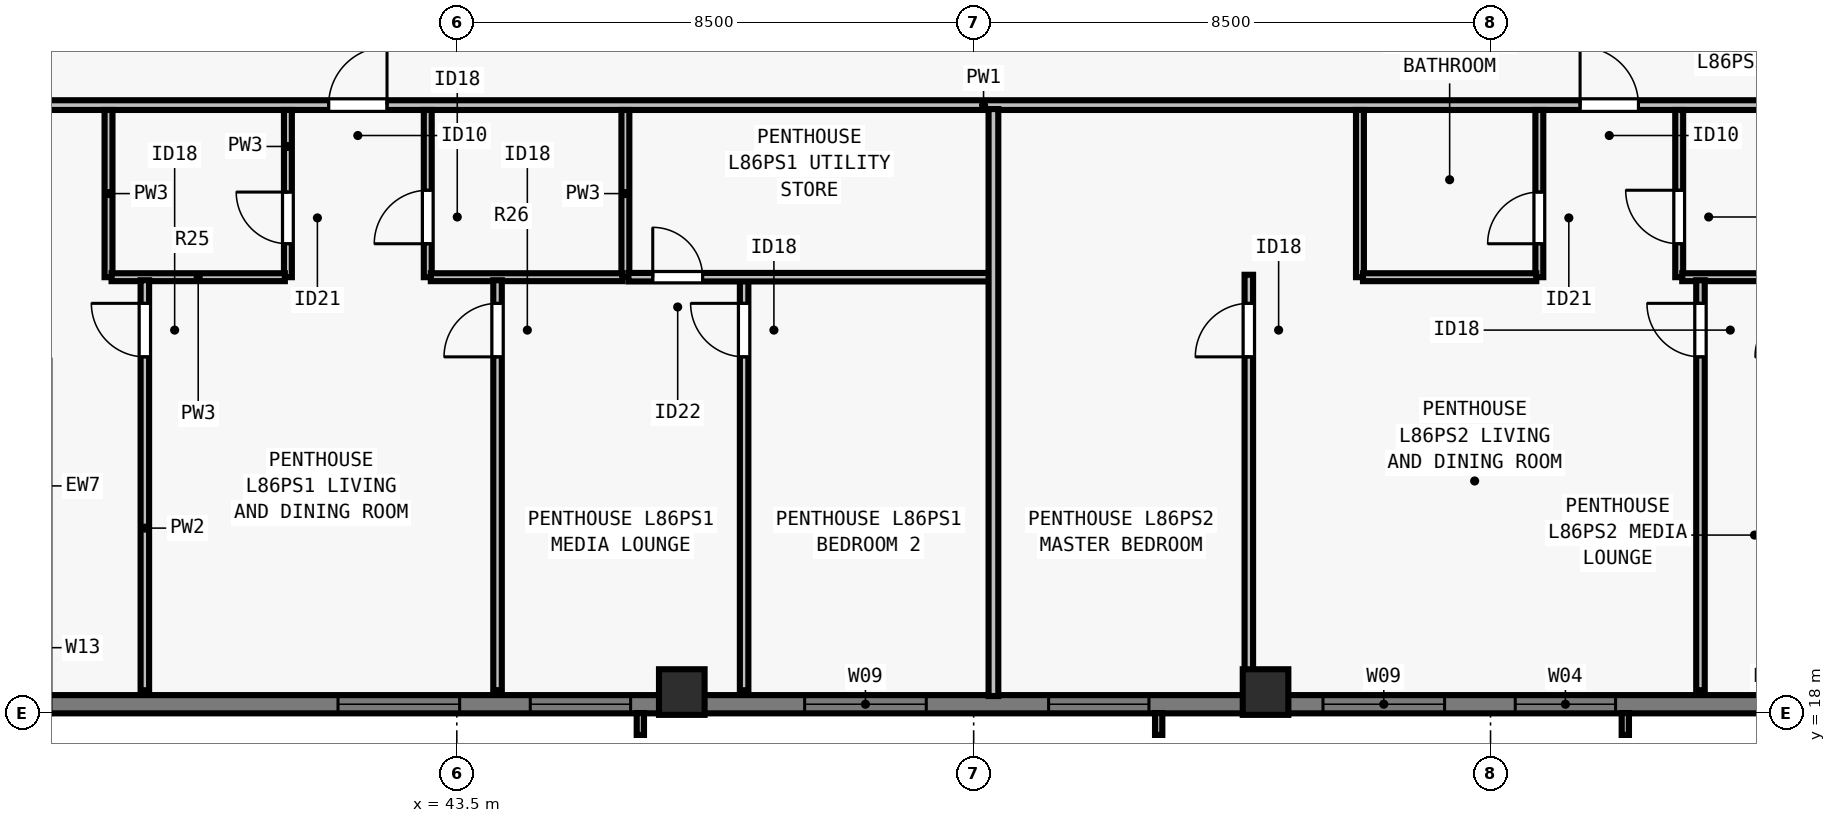
"""IFC4 building model, lengths in metres.
Left out: names, types, materials, properties, quantities, classifications, styles, units other than length and angle.
Written with IfcOpenShell. Run it as: python <this file> out.ifc"""

import sys

from ifc_helpers import new_model, si_unit, direction, frame, frame_2d, origin, origin_2d, place, context, subcontext, project, spatial, rectangle, extrude, element, fill, save


model = new_model("IFC4")
c1 = context("Model", 3, precision=1e-05, world=origin(), true_north=direction((0.0, 1.0)))
c2 = subcontext(c1, "Body", "Model", "MODEL_VIEW")
j1 = project(units=[si_unit("LENGTHUNIT", "METRE"), si_unit("PLANEANGLEUNIT", "RADIAN")], contexts=[c1])
p1 = place(None, origin())
s1 = spatial("IfcSite", under=j1, at=p1, CompositionType="ELEMENT")
p2 = place(p1, origin())
s2 = spatial("IfcBuilding", under=s1, at=p2, CompositionType="ELEMENT")
p3 = place(p2, frame((0.0, 0.0, 312.0)))
s3 = spatial("IfcBuildingStorey", under=s2, at=p3, CompositionType="ELEMENT", Elevation=312.0)
for number, where, z_axis, x_axis in (
    (1, (47.2, 18.35, 0.0), (0.0, 0.0, 1.0), (1.0, 0.0, 0.0)),
    (2, (56.8, 18.35, 0.0), (0.0, 0.0, 1.0), (1.0, 0.0, 0.0)),
):
    element("IfcColumn", number, at=place(p3, frame(where, z_axis=z_axis, x_axis=x_axis)), inside=s3, PredefinedType="COLUMN", context=c2, shape_type="SweptSolid", body=[
        extrude(rectangle(XDim=0.75, YDim=0.75, at=origin_2d()), origin(), (0.0, 0.0, 1.0), 3.5),
    ])
p4 = place(p3, frame((67.5, 18.15, 0.0), z_axis=(0.0, 0.0, 1.0), x_axis=(-1.0, 0.0, 0.0)))
e3 = element("IfcWall", 3, at=p4, inside=s3, PredefinedType="SOLIDWALL", context=c2, shape_type="SweptSolid", body=[
    extrude(rectangle(XDim=30.722, YDim=0.3, at=frame_2d((15.361, 0.0))), origin(), (0.0, 0.0, 1.0), 3.29),
])
p5 = place(p4, frame((4.944, 0.0, 0.8)))
e4 = element("IfcOpeningElement", 4, at=p5, cuts=e3, PredefinedType="OPENING", context=c2, shape_type="SweptSolid", body=[
    extrude(rectangle(XDim=1.65, YDim=1.758, at=frame_2d((0.825, 0.879))), frame((0.0, 0.16, 0.0), z_axis=(0.0, -1.0, 0.0), x_axis=(1.0, 0.0, 0.0)), (0.0, 0.0, 1.0), 0.32),
])
p6 = place(p4, frame((7.756, 0.0, 0.8)))
e5 = element("IfcOpeningElement", 5, at=p6, cuts=e3, PredefinedType="OPENING", context=c2, shape_type="SweptSolid", body=[
    extrude(rectangle(XDim=2.0, YDim=1.758, at=frame_2d((1.0, 0.879))), frame((0.0, 0.16, 0.0), z_axis=(0.0, -1.0, 0.0), x_axis=(1.0, 0.0, 0.0)), (0.0, 0.0, 1.0), 0.32),
])
p7 = place(p4, frame((12.617, 0.0, 0.8)))
e6 = element("IfcOpeningElement", 6, at=p7, cuts=e3, PredefinedType="OPENING", context=c2, shape_type="SweptSolid", body=[
    extrude(rectangle(XDim=1.65, YDim=1.758, at=frame_2d((0.825, 0.879))), frame((0.0, 0.16, 0.0), z_axis=(0.0, -1.0, 0.0), x_axis=(1.0, 0.0, 0.0)), (0.0, 0.0, 1.0), 0.32),
])
p8 = place(p4, frame((16.28, 0.0, 0.8)))
e7 = element("IfcOpeningElement", 7, at=p8, cuts=e3, PredefinedType="OPENING", context=c2, shape_type="SweptSolid", body=[
    extrude(rectangle(XDim=2.0, YDim=1.758, at=frame_2d((1.0, 0.879))), frame((0.0, 0.16, 0.0), z_axis=(0.0, -1.0, 0.0), x_axis=(1.0, 0.0, 0.0)), (0.0, 0.0, 1.0), 0.32),
])
p9 = place(p4, frame((21.142, 0.0, 0.8)))
e8 = element("IfcOpeningElement", 8, at=p9, cuts=e3, PredefinedType="OPENING", context=c2, shape_type="SweptSolid", body=[
    extrude(rectangle(XDim=1.65, YDim=1.758, at=frame_2d((0.825, 0.879))), frame((0.0, 0.16, 0.0), z_axis=(0.0, -1.0, 0.0), x_axis=(1.0, 0.0, 0.0)), (0.0, 0.0, 1.0), 0.32),
])
p10 = place(p4, frame((23.954, 0.0, 0.8)))
e9 = element("IfcOpeningElement", 9, at=p10, cuts=e3, PredefinedType="OPENING", context=c2, shape_type="SweptSolid", body=[
    extrude(rectangle(XDim=2.0, YDim=1.758, at=frame_2d((1.0, 0.879))), frame((0.0, 0.16, 0.0), z_axis=(0.0, -1.0, 0.0), x_axis=(1.0, 0.0, 0.0)), (0.0, 0.0, 1.0), 0.32),
])
p11 = place(p3, frame((31.285, 28.002, 0.0), z_axis=(0.0, 0.0, 1.0), x_axis=(1.0, 0.0, 0.0)))
e10 = element("IfcWall", 10, at=p11, inside=s3, PredefinedType="PARTITIONING", context=c2, shape_type="SweptSolid", body=[
    extrude(rectangle(XDim=41.43, YDim=0.16, at=frame_2d((20.715, 0.0))), origin(), (0.0, 0.0, 1.0), 3.009),
])
p12 = place(p11, frame((10.107, 0.0, 0.0)))
e11 = element("IfcOpeningElement", 11, at=p12, cuts=e10, PredefinedType="OPENING", context=c2, shape_type="SweptSolid", body=[
    extrude(rectangle(XDim=0.96, YDim=2.18, at=frame_2d((0.48, 1.09))), frame((0.0, 0.09, 0.0), z_axis=(0.0, -1.0, 0.0), x_axis=(1.0, 0.0, 0.0)), (0.0, 0.0, 1.0), 0.18),
])
p13 = place(p11, frame((30.688, 0.0, 0.0)))
e12 = element("IfcOpeningElement", 12, at=p13, cuts=e10, PredefinedType="OPENING", context=c2, shape_type="SweptSolid", body=[
    extrude(rectangle(XDim=0.96, YDim=2.18, at=frame_2d((0.48, 1.09))), frame((0.0, 0.09, 0.0), z_axis=(0.0, -1.0, 0.0), x_axis=(1.0, 0.0, 0.0)), (0.0, 0.0, 1.0), 0.18),
])
p14 = place(p3, frame((37.772, 25.173, 0.0), z_axis=(0.0, 0.0, 1.0), x_axis=(0.0, 1.0, 0.0)))
e13 = element("IfcWall", 13, at=p14, inside=s3, PredefinedType="PLUMBINGWALL", context=c2, shape_type="SweptSolid", body=[
    extrude(rectangle(XDim=2.75, YDim=0.13, at=frame_2d((1.375, 0.0))), origin(), (0.0, 0.0, 1.0), 3.29),
])
p15 = place(p3, frame((40.722, 25.173, 0.0), z_axis=(0.0, 0.0, 1.0), x_axis=(0.0, 1.0, 0.0)))
e14 = element("IfcWall", 14, at=p15, inside=s3, PredefinedType="PLUMBINGWALL", context=c2, shape_type="SweptSolid", body=[
    extrude(rectangle(XDim=2.75, YDim=0.13, at=frame_2d((1.375, 0.0))), origin(), (0.0, 0.0, 1.0), 2.653),
])
p16 = place(p15, frame((0.55, 0.0, 0.0)))
e15 = element("IfcOpeningElement", 15, at=p16, cuts=e14, PredefinedType="OPENING", context=c2, shape_type="SweptSolid", body=[
    extrude(rectangle(XDim=0.85, YDim=2.08, at=frame_2d((0.425, 1.04))), frame((0.0, 0.075, 0.0), z_axis=(0.0, -1.0, 0.0), x_axis=(1.0, 0.0, 0.0)), (0.0, 0.0, 1.0), 0.15),
])
p17 = place(p3, frame((37.823, 25.173, 0.0), z_axis=(0.0, 0.0, 1.0), x_axis=(1.0, 0.0, 0.0)))
e16 = element("IfcWall", 16, at=p17, inside=s3, PredefinedType="PLUMBINGWALL", context=c2, shape_type="SweptSolid", body=[
    extrude(rectangle(XDim=2.85, YDim=0.13, at=frame_2d((1.425, 0.0))), origin(), (0.0, 0.0, 1.0), 3.29),
])
p18 = place(p3, frame((46.272, 25.173, 0.0), z_axis=(0.0, 0.0, 1.0), x_axis=(0.0, 1.0, 0.0)))
e17 = element("IfcWall", 17, at=p18, inside=s3, PredefinedType="PLUMBINGWALL", context=c2, shape_type="SweptSolid", body=[
    extrude(rectangle(XDim=2.75, YDim=0.13, at=frame_2d((1.375, 0.0))), origin(), (0.0, 0.0, 1.0), 3.29),
])
p19 = place(p3, frame((43.022, 25.173, 0.0), z_axis=(0.0, 0.0, 1.0), x_axis=(0.0, 1.0, 0.0)))
e18 = element("IfcWall", 18, at=p19, inside=s3, PredefinedType="PLUMBINGWALL", context=c2, shape_type="SweptSolid", body=[
    extrude(rectangle(XDim=2.75, YDim=0.13, at=frame_2d((1.375, 0.0))), origin(), (0.0, 0.0, 1.0), 3.29),
])
p20 = place(p19, frame((0.55, 0.0, 0.0)))
e19 = element("IfcOpeningElement", 19, at=p20, cuts=e18, PredefinedType="OPENING", context=c2, shape_type="SweptSolid", body=[
    extrude(rectangle(XDim=0.88, YDim=2.1, at=frame_2d((0.44, 1.05))), frame((0.0, 0.075, 0.0), z_axis=(0.0, -1.0, 0.0), x_axis=(1.0, 0.0, 0.0)), (0.0, 0.0, 1.0), 0.15),
])
p21 = place(p3, frame((43.073, 25.173, 0.0), z_axis=(0.0, 0.0, 1.0), x_axis=(1.0, 0.0, 0.0)))
e20 = element("IfcWall", 20, at=p21, inside=s3, PredefinedType="PLUMBINGWALL", context=c2, shape_type="SweptSolid", body=[
    extrude(rectangle(XDim=3.15, YDim=0.13, at=frame_2d((1.575, 0.0))), origin(), (0.0, 0.0, 1.0), 3.29),
])
p22 = place(p3, frame((38.37, 18.38, 0.0), z_axis=(0.0, 0.0, 1.0), x_axis=(0.0, 1.0, 0.0)))
e21 = element("IfcWall", 21, at=p22, inside=s3, PredefinedType="PARTITIONING", context=c2, shape_type="SweptSolid", body=[
    extrude(rectangle(XDim=6.743, YDim=0.14, at=frame_2d((3.371, 0.0))), origin(), (0.0, 0.0, 1.0), 2.653),
])
p23 = place(p22, frame((5.482, 0.0, 0.0)))
e22 = element("IfcOpeningElement", 22, at=p23, cuts=e21, PredefinedType="OPENING", context=c2, shape_type="SweptSolid", body=[
    extrude(rectangle(XDim=0.88, YDim=2.1, at=frame_2d((0.44, 1.05))), frame((0.0, 0.08, 0.0), z_axis=(0.0, -1.0, 0.0), x_axis=(1.0, 0.0, 0.0)), (0.0, 0.0, 1.0), 0.16),
])
p24 = place(p3, frame((48.225, 18.38, 0.0), z_axis=(0.0, 0.0, 1.0), x_axis=(0.0, 1.0, 0.0)))
e23 = element("IfcWall", 23, at=p24, inside=s3, PredefinedType="PARTITIONING", context=c2, shape_type="SweptSolid", body=[
    extrude(rectangle(XDim=6.833, YDim=0.14, at=frame_2d((3.416, 0.0))), origin(), (0.0, 0.0, 1.0), 3.009),
])
p25 = place(p24, frame((5.482, 0.0, 0.0)))
e24 = element("IfcOpeningElement", 24, at=p25, cuts=e23, PredefinedType="OPENING", context=c2, shape_type="SweptSolid", body=[
    extrude(rectangle(XDim=0.88, YDim=2.1, at=frame_2d((0.44, 1.05))), frame((0.0, 0.08, 0.0), z_axis=(0.0, -1.0, 0.0), x_axis=(1.0, 0.0, 0.0)), (0.0, 0.0, 1.0), 0.16),
])
p26 = place(p3, frame((46.323, 25.173, 0.0), z_axis=(0.0, 0.0, 1.0), x_axis=(1.0, 0.0, 0.0)))
e25 = element("IfcWall", 25, at=p26, inside=s3, PredefinedType="PARTITIONING", context=c2, shape_type="SweptSolid", body=[
    extrude(rectangle(XDim=6.052, YDim=0.14, at=frame_2d((3.026, 0.0))), origin(), (0.0, 0.0, 1.0), 3.29),
])
p27 = place(p26, frame((0.4, 0.0, 0.0)))
e26 = element("IfcOpeningElement", 26, at=p27, cuts=e25, PredefinedType="OPENING", context=c2, shape_type="SweptSolid", body=[
    extrude(rectangle(XDim=0.82, YDim=2.1, at=frame_2d((0.41, 1.05))), frame((0.0, 0.08, 0.0), z_axis=(0.0, -1.0, 0.0), x_axis=(1.0, 0.0, 0.0)), (0.0, 0.0, 1.0), 0.16),
])
p28 = place(p3, frame((44.17, 18.38, 0.0), z_axis=(0.0, 0.0, 1.0), x_axis=(0.0, 1.0, 0.0)))
e27 = element("IfcWall", 27, at=p28, inside=s3, PredefinedType="PARTITIONING", context=c2, shape_type="SweptSolid", body=[
    extrude(rectangle(XDim=6.743, YDim=0.14, at=frame_2d((3.371, 0.0))), origin(), (0.0, 0.0, 1.0), 3.29),
])
p29 = place(p28, frame((5.482, 0.0, 0.0)))
e28 = element("IfcOpeningElement", 28, at=p29, cuts=e27, PredefinedType="OPENING", context=c2, shape_type="SweptSolid", body=[
    extrude(rectangle(XDim=0.88, YDim=2.1, at=frame_2d((0.44, 1.05))), frame((0.0, 0.08, 0.0), z_axis=(0.0, -1.0, 0.0), x_axis=(1.0, 0.0, 0.0)), (0.0, 0.0, 1.0), 0.16),
])
p30 = place(p3, frame((52.325, 18.285, 0.0), z_axis=(0.0, 0.0, 1.0), x_axis=(0.0, 1.0, 0.0)))
e29 = element("IfcWall", 29, at=p30, inside=s3, PredefinedType="PARTITIONING", context=c2, shape_type="SweptSolid", body=[
    extrude(rectangle(XDim=9.653, YDim=0.16, at=frame_2d((4.826, 0.0))), origin(), (0.0, 0.0, 1.0), 3.009),
])
p31 = place(p3, frame((58.353, 25.173, 0.0), z_axis=(0.0, 0.0, 1.0), x_axis=(0.0, 1.0, 0.0)))
e30 = element("IfcWall", 30, at=p31, inside=s3, PredefinedType="PLUMBINGWALL", context=c2, shape_type="SweptSolid", body=[
    extrude(rectangle(XDim=2.75, YDim=0.13, at=frame_2d((1.375, 0.0))), origin(), (0.0, 0.0, 1.0), 3.29),
])
p32 = place(p3, frame((61.302, 25.173, 0.0), z_axis=(0.0, 0.0, 1.0), x_axis=(0.0, 1.0, 0.0)))
e31 = element("IfcWall", 31, at=p32, inside=s3, PredefinedType="PLUMBINGWALL", context=c2, shape_type="SweptSolid", body=[
    extrude(rectangle(XDim=2.75, YDim=0.13, at=frame_2d((1.375, 0.0))), origin(), (0.0, 0.0, 1.0), 3.29),
])
p33 = place(p32, frame((0.55, 0.0, 0.0)))
e32 = element("IfcOpeningElement", 32, at=p33, cuts=e31, PredefinedType="OPENING", context=c2, shape_type="SweptSolid", body=[
    extrude(rectangle(XDim=0.85, YDim=2.08, at=frame_2d((0.425, 1.04))), frame((0.0, 0.075, 0.0), z_axis=(0.0, -1.0, 0.0), x_axis=(1.0, 0.0, 0.0)), (0.0, 0.0, 1.0), 0.15),
])
p34 = place(p3, frame((58.403, 25.173, 0.0), z_axis=(0.0, 0.0, 1.0), x_axis=(1.0, 0.0, 0.0)))
e33 = element("IfcWall", 33, at=p34, inside=s3, PredefinedType="PLUMBINGWALL", context=c2, shape_type="SweptSolid", body=[
    extrude(rectangle(XDim=2.85, YDim=0.13, at=frame_2d((1.425, 0.0))), origin(), (0.0, 0.0, 1.0), 3.29),
])
p35 = place(p3, frame((63.603, 25.173, 0.0), z_axis=(0.0, 0.0, 1.0), x_axis=(0.0, 1.0, 0.0)))
e34 = element("IfcWall", 34, at=p35, inside=s3, PredefinedType="PLUMBINGWALL", context=c2, shape_type="SweptSolid", body=[
    extrude(rectangle(XDim=2.75, YDim=0.13, at=frame_2d((1.375, 0.0))), origin(), (0.0, 0.0, 1.0), 3.29),
])
p36 = place(p35, frame((0.55, 0.0, 0.0)))
e35 = element("IfcOpeningElement", 35, at=p36, cuts=e34, PredefinedType="OPENING", context=c2, shape_type="SweptSolid", body=[
    extrude(rectangle(XDim=0.88, YDim=2.1, at=frame_2d((0.44, 1.05))), frame((0.0, 0.075, 0.0), z_axis=(0.0, -1.0, 0.0), x_axis=(1.0, 0.0, 0.0)), (0.0, 0.0, 1.0), 0.15),
])
p37 = place(p3, frame((63.653, 25.173, 0.0), z_axis=(0.0, 0.0, 1.0), x_axis=(1.0, 0.0, 0.0)))
e36 = element("IfcWall", 36, at=p37, inside=s3, PredefinedType="PLUMBINGWALL", context=c2, shape_type="SweptSolid", body=[
    extrude(rectangle(XDim=3.15, YDim=0.13, at=frame_2d((1.575, 0.0))), origin(), (0.0, 0.0, 1.0), 3.29),
])
p38 = place(p3, frame((56.525, 18.38, 0.0), z_axis=(0.0, 0.0, 1.0), x_axis=(0.0, 1.0, 0.0)))
e37 = element("IfcWall", 37, at=p38, inside=s3, PredefinedType="PARTITIONING", context=c2, shape_type="SweptSolid", body=[
    extrude(rectangle(XDim=6.833, YDim=0.14, at=frame_2d((3.416, 0.0))), origin(), (0.0, 0.0, 1.0), 3.29),
])
p39 = place(p38, frame((5.482, 0.0, 0.0)))
e38 = element("IfcOpeningElement", 38, at=p39, cuts=e37, PredefinedType="OPENING", context=c2, shape_type="SweptSolid", body=[
    extrude(rectangle(XDim=0.88, YDim=2.1, at=frame_2d((0.44, 1.05))), frame((0.0, 0.08, 0.0), z_axis=(0.0, -1.0, 0.0), x_axis=(1.0, 0.0, 0.0)), (0.0, 0.0, 1.0), 0.16),
])
p40 = place(p3, frame((63.952, 18.38, 0.0), z_axis=(0.0, 0.0, 1.0), x_axis=(0.0, 1.0, 0.0)))
e39 = element("IfcWall", 39, at=p40, inside=s3, PredefinedType="PARTITIONING", context=c2, shape_type="SweptSolid", body=[
    extrude(rectangle(XDim=6.743, YDim=0.14, at=frame_2d((3.371, 0.0))), origin(), (0.0, 0.0, 1.0), 2.653),
])
p41 = place(p40, frame((5.482, 0.0, 0.0)))
e40 = element("IfcOpeningElement", 40, at=p41, cuts=e39, PredefinedType="OPENING", context=c2, shape_type="SweptSolid", body=[
    extrude(rectangle(XDim=0.88, YDim=2.1, at=frame_2d((0.44, 1.05))), frame((0.0, 0.08, 0.0), z_axis=(0.0, -1.0, 0.0), x_axis=(1.0, 0.0, 0.0)), (0.0, 0.0, 1.0), 0.16),
])
p42 = place(p5, origin())
e41 = element("IfcWindow", 41, at=p42, inside=s3, PartitioningType="SINGLE_PANEL", PredefinedType="WINDOW", context=c2, shape_type="SweptSolid", body=[
    extrude(rectangle(XDim=1.65, YDim=1.758, at=frame_2d((0.825, 0.879))), frame((0.0, -0.05, 0.0), z_axis=(0.0, -1.0, 0.0), x_axis=(1.0, 0.0, 0.0)), (0.0, 0.0, 1.0), 0.06),
])
fill(e4, e41)
p43 = place(p6, origin())
e42 = element("IfcWindow", 42, at=p43, inside=s3, PartitioningType="SINGLE_PANEL", PredefinedType="WINDOW", context=c2, shape_type="SweptSolid", body=[
    extrude(rectangle(XDim=2.0, YDim=1.758, at=frame_2d((1.0, 0.879))), frame((0.0, -0.05, 0.0), z_axis=(0.0, -1.0, 0.0), x_axis=(1.0, 0.0, 0.0)), (0.0, 0.0, 1.0), 0.06),
])
fill(e5, e42)
p44 = place(p7, origin())
e43 = element("IfcWindow", 43, at=p44, inside=s3, PartitioningType="SINGLE_PANEL", PredefinedType="WINDOW", context=c2, shape_type="SweptSolid", body=[
    extrude(rectangle(XDim=1.65, YDim=1.758, at=frame_2d((0.825, 0.879))), frame((0.0, -0.05, 0.0), z_axis=(0.0, -1.0, 0.0), x_axis=(1.0, 0.0, 0.0)), (0.0, 0.0, 1.0), 0.06),
])
fill(e6, e43)
p45 = place(p8, origin())
e44 = element("IfcWindow", 44, at=p45, inside=s3, PartitioningType="SINGLE_PANEL", PredefinedType="WINDOW", context=c2, shape_type="SweptSolid", body=[
    extrude(rectangle(XDim=2.0, YDim=1.758, at=frame_2d((1.0, 0.879))), frame((0.0, -0.05, 0.0), z_axis=(0.0, -1.0, 0.0), x_axis=(1.0, 0.0, 0.0)), (0.0, 0.0, 1.0), 0.06),
])
fill(e7, e44)
p46 = place(p9, origin())
e45 = element("IfcWindow", 45, at=p46, inside=s3, PartitioningType="SINGLE_PANEL", PredefinedType="WINDOW", context=c2, shape_type="SweptSolid", body=[
    extrude(rectangle(XDim=1.65, YDim=1.758, at=frame_2d((0.825, 0.879))), frame((0.0, -0.05, 0.0), z_axis=(0.0, -1.0, 0.0), x_axis=(1.0, 0.0, 0.0)), (0.0, 0.0, 1.0), 0.06),
])
fill(e8, e45)
p47 = place(p10, origin())
e46 = element("IfcWindow", 46, at=p47, inside=s3, PartitioningType="SINGLE_PANEL", PredefinedType="WINDOW", context=c2, shape_type="SweptSolid", body=[
    extrude(rectangle(XDim=2.0, YDim=1.758, at=frame_2d((1.0, 0.879))), frame((0.0, -0.05, 0.0), z_axis=(0.0, -1.0, 0.0), x_axis=(1.0, 0.0, 0.0)), (0.0, 0.0, 1.0), 0.06),
])
fill(e9, e46)
p48 = place(p16, origin())
e47 = element("IfcDoor", 47, at=p48, inside=s3, OperationType="SINGLE_SWING_RIGHT", PredefinedType="DOOR", context=c2, shape_type="SweptSolid", body=[
    extrude(rectangle(XDim=0.85, YDim=2.08, at=frame_2d((0.425, 1.04))), frame((0.0, 0.025, 0.0), z_axis=(0.0, -1.0, 0.0), x_axis=(1.0, 0.0, 0.0)), (0.0, 0.0, 1.0), 0.05),
])
fill(e15, e47)
p49 = place(p20, origin())
e48 = element("IfcDoor", 48, at=p49, inside=s3, OperationType="SINGLE_SWING_LEFT", PredefinedType="DOOR", context=c2, shape_type="SweptSolid", body=[
    extrude(rectangle(XDim=0.88, YDim=2.1, at=frame_2d((0.44, 1.05))), frame((0.0, 0.025, 0.0), z_axis=(0.0, -1.0, 0.0), x_axis=(1.0, 0.0, 0.0)), (0.0, 0.0, 1.0), 0.05),
])
fill(e19, e48)
p50 = place(p23, origin())
e49 = element("IfcDoor", 49, at=p50, inside=s3, OperationType="SINGLE_SWING_RIGHT", PredefinedType="DOOR", context=c2, shape_type="SweptSolid", body=[
    extrude(rectangle(XDim=0.88, YDim=2.1, at=frame_2d((0.44, 1.05))), frame((0.0, 0.025, 0.0), z_axis=(0.0, -1.0, 0.0), x_axis=(1.0, 0.0, 0.0)), (0.0, 0.0, 1.0), 0.05),
])
fill(e22, e49)
p51 = place(p27, origin())
e50 = element("IfcDoor", 50, at=p51, inside=s3, OperationType="SINGLE_SWING_LEFT", PredefinedType="DOOR", context=c2, shape_type="SweptSolid", body=[
    extrude(rectangle(XDim=0.82, YDim=2.1, at=frame_2d((0.41, 1.05))), frame((0.0, 0.025, 0.0), z_axis=(0.0, -1.0, 0.0), x_axis=(1.0, 0.0, 0.0)), (0.0, 0.0, 1.0), 0.05),
])
fill(e26, e50)
p52 = place(p25, origin())
e51 = element("IfcDoor", 51, at=p52, inside=s3, OperationType="SINGLE_SWING_RIGHT", PredefinedType="DOOR", context=c2, shape_type="SweptSolid", body=[
    extrude(rectangle(XDim=0.88, YDim=2.1, at=frame_2d((0.44, 1.05))), frame((0.0, 0.025, 0.0), z_axis=(0.0, -1.0, 0.0), x_axis=(1.0, 0.0, 0.0)), (0.0, 0.0, 1.0), 0.05),
])
fill(e24, e51)
p53 = place(p29, origin())
e52 = element("IfcDoor", 52, at=p53, inside=s3, OperationType="SINGLE_SWING_LEFT", PredefinedType="DOOR", context=c2, shape_type="SweptSolid", body=[
    extrude(rectangle(XDim=0.88, YDim=2.1, at=frame_2d((0.44, 1.05))), frame((0.0, 0.025, 0.0), z_axis=(0.0, -1.0, 0.0), x_axis=(1.0, 0.0, 0.0)), (0.0, 0.0, 1.0), 0.05),
])
fill(e28, e52)
p54 = place(p12, origin())
e53 = element("IfcDoor", 53, at=p54, inside=s3, OperationType="SINGLE_SWING_RIGHT", PredefinedType="DOOR", context=c2, shape_type="SweptSolid", body=[
    extrude(rectangle(XDim=0.96, YDim=2.18, at=frame_2d((0.48, 1.09))), frame((0.0, 0.025, 0.0), z_axis=(0.0, -1.0, 0.0), x_axis=(1.0, 0.0, 0.0)), (0.0, 0.0, 1.0), 0.05),
])
fill(e11, e53)
p55 = place(p33, origin())
e54 = element("IfcDoor", 54, at=p55, inside=s3, OperationType="SINGLE_SWING_LEFT", PredefinedType="DOOR", context=c2, shape_type="SweptSolid", body=[
    extrude(rectangle(XDim=0.85, YDim=2.08, at=frame_2d((0.425, 1.04))), frame((0.0, 0.025, 0.0), z_axis=(0.0, -1.0, 0.0), x_axis=(1.0, 0.0, 0.0)), (0.0, 0.0, 1.0), 0.05),
])
fill(e32, e54)
p56 = place(p36, origin())
e55 = element("IfcDoor", 55, at=p56, inside=s3, OperationType="SINGLE_SWING_RIGHT", PredefinedType="DOOR", context=c2, shape_type="SweptSolid", body=[
    extrude(rectangle(XDim=0.88, YDim=2.1, at=frame_2d((0.44, 1.05))), frame((0.0, 0.025, 0.0), z_axis=(0.0, -1.0, 0.0), x_axis=(1.0, 0.0, 0.0)), (0.0, 0.0, 1.0), 0.05),
])
fill(e35, e55)
p57 = place(p39, origin())
e56 = element("IfcDoor", 56, at=p57, inside=s3, OperationType="SINGLE_SWING_LEFT", PredefinedType="DOOR", context=c2, shape_type="SweptSolid", body=[
    extrude(rectangle(XDim=0.88, YDim=2.1, at=frame_2d((0.44, 1.05))), frame((0.0, 0.025, 0.0), z_axis=(0.0, -1.0, 0.0), x_axis=(1.0, 0.0, 0.0)), (0.0, 0.0, 1.0), 0.05),
])
fill(e38, e56)
p58 = place(p41, origin())
e57 = element("IfcDoor", 57, at=p58, inside=s3, OperationType="SINGLE_SWING_RIGHT", PredefinedType="DOOR", context=c2, shape_type="SweptSolid", body=[
    extrude(rectangle(XDim=0.88, YDim=2.1, at=frame_2d((0.44, 1.05))), frame((0.0, 0.025, 0.0), z_axis=(0.0, -1.0, 0.0), x_axis=(1.0, 0.0, 0.0)), (0.0, 0.0, 1.0), 0.05),
])
fill(e40, e57)
p59 = place(p13, origin())
e58 = element("IfcDoor", 58, at=p59, inside=s3, OperationType="SINGLE_SWING_LEFT", PredefinedType="DOOR", context=c2, shape_type="SweptSolid", body=[
    extrude(rectangle(XDim=0.96, YDim=2.18, at=frame_2d((0.48, 1.09))), frame((0.0, 0.025, 0.0), z_axis=(0.0, -1.0, 0.0), x_axis=(1.0, 0.0, 0.0)), (0.0, 0.0, 1.0), 0.05),
])
fill(e12, e58)
save(model, sys.argv[1])
